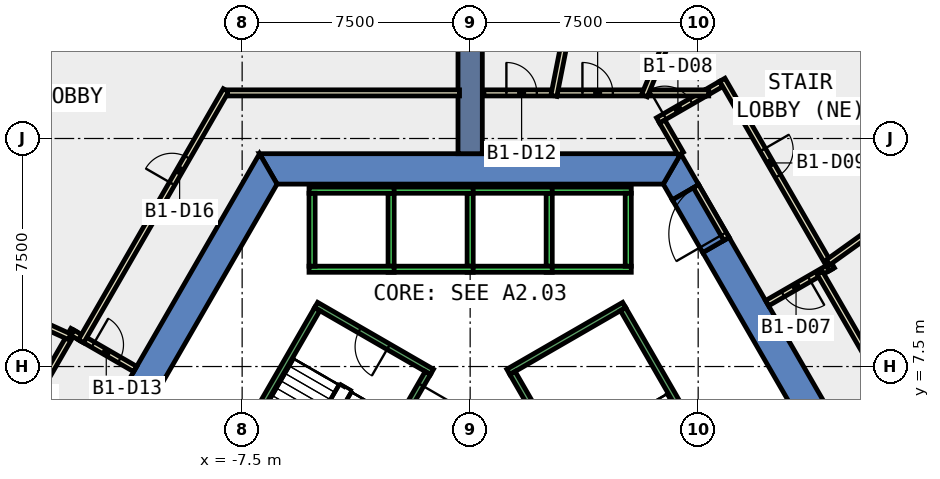
"""IFC4 building model, lengths in metres.
Left out: names, types, materials, properties, quantities, classifications, styles, units other than length and angle.
Written with IfcOpenShell. Run it as: python <this file> out.ifc"""

import sys

from ifc_helpers import new_model, si_unit, direction, frame, frame_2d, origin, place, context, subcontext, project, spatial, polyline, rectangle, outline, extrude, element, fill, save


model = new_model("IFC4")
c1 = context("Model", 3, precision=1e-05, world=origin(), true_north=direction((0.0, 1.0)))
c2 = subcontext(c1, "Body", "Model", "MODEL_VIEW")
j1 = project(units=[si_unit("LENGTHUNIT", "METRE"), si_unit("PLANEANGLEUNIT", "RADIAN")], contexts=[c1])
p1 = place(None, origin())
s1 = spatial("IfcSite", under=j1, at=p1, CompositionType="ELEMENT")
p2 = place(p1, origin())
s2 = spatial("IfcBuilding", under=s1, at=p2, CompositionType="ELEMENT")
p3 = place(p2, frame((0.0, 0.0, -5.5)))
s3 = spatial("IfcBuildingStorey", under=s2, at=p3, CompositionType="ELEMENT", Elevation=-5.5)
p4 = place(p3, frame((0.0, 0.0, -0.42)))
e1 = element("IfcWall", 1, at=p4, inside=s3, PredefinedType="SHEAR", context=c2, shape_type="SweptSolid", body=[
    extrude(outline(polyline([(8.517, 11.748), (7.651, 11.248), (12.702, 2.5), (13.856, 2.5), (8.517, 11.748)])), origin(), (0.0, 0.0, 1.0), 5.42),
])
p5 = place(p3, frame((0.0, 0.0, -0.42)))
e2 = element("IfcWall", 2, at=p5, inside=s3, PredefinedType="SHEAR", context=c2, shape_type="SweptSolid", body=[
    extrude(outline(polyline([(6.651, 12.98), (7.517, 13.48), (6.928, 14.5), (6.351, 13.5), (6.651, 12.98)])), origin(), (0.0, 0.0, 1.0), 5.42),
])
p6 = place(p3, frame((0.0, 0.0, 3.6)))
e3 = element("IfcWall", 3, at=p6, inside=s3, PredefinedType="SHEAR", context=c2, shape_type="SweptSolid", body=[
    extrude(outline(polyline([(7.517, 13.48), (6.651, 12.98), (7.651, 11.248), (8.517, 11.748), (7.517, 13.48)])), origin(), (0.0, 0.0, 1.0), 1.4),
])
p7 = place(p3, frame((0.0, 0.0, -0.42)))
e4 = element("IfcWall", 4, at=p7, inside=s3, PredefinedType="SHEAR", context=c2, shape_type="SweptSolid", body=[
    extrude(outline(polyline([(6.928, 14.5), (-6.928, 14.5), (-6.351, 13.5), (6.351, 13.5), (6.928, 14.5)])), origin(), (0.0, 0.0, 1.0), 5.42),
])
p8 = place(p3, frame((0.0, 0.0, -0.42)))
e5 = element("IfcWall", 5, at=p8, inside=s3, PredefinedType="SHEAR", context=c2, shape_type="SweptSolid", body=[
    extrude(outline(polyline([(-12.267, 5.252), (-11.402, 4.752), (-6.351, 13.5), (-6.928, 14.5), (-12.267, 5.252)])), origin(), (0.0, 0.0, 1.0), 5.42),
])
p9 = place(p3, frame((0.0, 14.5, -0.42), z_axis=(0.0, 0.0, 1.0), x_axis=(0.0, 1.0, 0.0)))
e6 = element("IfcWall", 6, at=p9, inside=s3, PredefinedType="SHEAR", context=c2, shape_type="SweptSolid", body=[
    extrude(rectangle(XDim=9.0, YDim=0.8, at=frame_2d((4.5, 0.0))), origin(), (0.0, 0.0, 1.0), 5.42),
])
p10 = place(p3, frame((11.845, 10.783, 0.0), z_axis=(0.0, 0.0, 1.0), x_axis=(-0.865973769406, -0.500089422704, 0.0)))
e7 = element("IfcWall", 7, at=p10, inside=s3, PredefinedType="PARTITIONING", context=c2, shape_type="SweptSolid", body=[
    extrude(rectangle(XDim=2.399, YDim=0.2, at=frame_2d((1.2, 0.0))), origin(), (0.0, 0.0, 1.0), 4.9),
])
p11 = place(p10, frame((0.8, 0.0, 0.0)))
e8 = element("IfcOpeningElement", 8, at=p11, cuts=e7, PredefinedType="OPENING", context=c2, shape_type="SweptSolid", body=[
    extrude(rectangle(XDim=1.0, YDim=2.1, at=frame_2d((0.5, 1.05))), frame((0.0, 0.11, 0.0), z_axis=(0.0, -1.0, 0.0), x_axis=(1.0, 0.0, 0.0)), (0.0, 0.0, 1.0), 0.22),
])
p12 = place(p3, frame((6.18, 15.595, 0.0), z_axis=(0.0, 0.0, 1.0), x_axis=(0.866102512622, 0.499866419787, 0.0)))
e9 = element("IfcWall", 9, at=p12, inside=s3, PredefinedType="PARTITIONING", context=c2, shape_type="SweptSolid", body=[
    extrude(rectangle(XDim=1.811, YDim=0.2, at=frame_2d((0.905, 0.0))), origin(), (0.0, 0.0, 1.0), 4.9),
])
p13 = place(p12, frame((0.254, 0.0, 0.0)))
e10 = element("IfcOpeningElement", 10, at=p13, cuts=e9, PredefinedType="OPENING", context=c2, shape_type="SweptSolid", body=[
    extrude(rectangle(XDim=1.0, YDim=2.1, at=frame_2d((0.5, 1.05))), frame((0.0, 0.11, 0.0), z_axis=(0.0, -1.0, 0.0), x_axis=(1.0, 0.0, 0.0)), (0.0, 0.0, 1.0), 0.22),
])
p14 = place(p3, frame((6.317, 15.558, 0.0), z_axis=(0.0, 0.0, 1.0), x_axis=(0.500114474492, -0.865959301817, 0.0)))
e11 = element("IfcWall", 11, at=p14, inside=s3, PredefinedType="PARTITIONING", context=c2, shape_type="SweptSolid", body=[
    extrude(rectangle(XDim=1.222, YDim=0.2, at=frame_2d((0.611, 0.0))), origin(), (0.0, 0.0, 1.0), 4.9),
])
p15 = place(p3, frame((7.748, 16.5, 0.0), z_axis=(0.0, 0.0, 1.0), x_axis=(0.865681519127, 0.500595153234, 0.0)))
e12 = element("IfcWall", 12, at=p15, inside=s3, PredefinedType="PARTITIONING", context=c2, shape_type="SweptSolid", body=[
    extrude(rectangle(XDim=0.589, YDim=0.2, at=frame_2d((0.294, 0.0))), origin(), (0.0, 0.0, 1.0), 4.9),
])
p16 = place(p3, frame((8.295, 16.932, 0.0), z_axis=(0.0, 0.0, 1.0), x_axis=(0.499982693035, -0.866035395735, 0.0)))
e13 = element("IfcWall", 13, at=p16, inside=s3, PredefinedType="PARTITIONING", context=c2, shape_type="SweptSolid", body=[
    extrude(rectangle(XDim=7.2, YDim=0.2, at=frame_2d((3.6, 0.0))), origin(), (0.0, 0.0, 1.0), 4.9),
])
p17 = place(p16, frame((2.659, 0.0, 0.0)))
e14 = element("IfcOpeningElement", 14, at=p17, cuts=e13, PredefinedType="OPENING", context=c2, shape_type="SweptSolid", body=[
    extrude(rectangle(XDim=1.0, YDim=2.1, at=frame_2d((0.5, 1.05))), frame((0.0, 0.11, 0.0), z_axis=(0.0, -1.0, 0.0), x_axis=(1.0, 0.0, 0.0)), (0.0, 0.0, 1.0), 0.22),
])
p18 = place(p3, frame((11.499, 10.583, 0.0), z_axis=(0.0, 0.0, 1.0), x_axis=(0.499933044277, -0.866064057238, 0.0)))
e15 = element("IfcWall", 15, at=p18, inside=s3, PredefinedType="PARTITIONING", context=c2, shape_type="SweptSolid", body=[
    extrude(rectangle(XDim=9.433, YDim=0.2, at=frame_2d((4.717, 0.0))), origin(), (0.0, 0.0, 1.0), 4.9),
])
p19 = place(p18, frame((8.283, 0.0, 0.0)))
e16 = element("IfcOpeningElement", 16, at=p19, cuts=e15, PredefinedType="OPENING", context=c2, shape_type="SweptSolid", body=[
    extrude(rectangle(XDim=1.0, YDim=2.1, at=frame_2d((0.5, 1.05))), frame((0.0, 0.11, 0.0), z_axis=(0.0, -1.0, 0.0), x_axis=(1.0, 0.0, 0.0)), (0.0, 0.0, 1.0), 0.22),
])
p20 = place(p3, frame((5.871, 16.5, 0.0), z_axis=(0.0, 0.0, 1.0), x_axis=(1.0, 0.0, 0.0)))
e17 = element("IfcWall", 17, at=p20, inside=s3, PredefinedType="PARTITIONING", context=c2, shape_type="SweptSolid", body=[
    extrude(rectangle(XDim=1.977, YDim=0.2, at=frame_2d((0.988, 0.0))), origin(), (0.0, 0.0, 1.0), 4.9),
])
p21 = place(p3, frame((2.872, 16.5, 0.0), z_axis=(0.0, 0.0, 1.0), x_axis=(1.0, 0.0, 0.0)))
e18 = element("IfcWall", 18, at=p21, inside=s3, PredefinedType="PARTITIONING", context=c2, shape_type="SweptSolid", body=[
    extrude(rectangle(XDim=2.799, YDim=0.2, at=frame_2d((1.399, 0.0))), origin(), (0.0, 0.0, 1.0), 4.9),
])
p22 = place(p21, frame((0.821, 0.0, 0.0)))
e19 = element("IfcOpeningElement", 19, at=p22, cuts=e18, PredefinedType="OPENING", context=c2, shape_type="SweptSolid", body=[
    extrude(rectangle(XDim=1.0, YDim=2.1, at=frame_2d((0.5, 1.05))), frame((0.0, 0.11, 0.0), z_axis=(0.0, -1.0, 0.0), x_axis=(1.0, 0.0, 0.0)), (0.0, 0.0, 1.0), 0.22),
])
p23 = place(p3, frame((0.45, 16.5, 0.0), z_axis=(0.0, 0.0, 1.0), x_axis=(1.0, 0.0, 0.0)))
e20 = element("IfcWall", 20, at=p23, inside=s3, PredefinedType="PARTITIONING", context=c2, shape_type="SweptSolid", body=[
    extrude(rectangle(XDim=2.222, YDim=0.2, at=frame_2d((1.111, 0.0))), origin(), (0.0, 0.0, 1.0), 4.9),
])
p24 = place(p23, frame((0.742, 0.0, 0.0)))
e21 = element("IfcOpeningElement", 21, at=p24, cuts=e20, PredefinedType="OPENING", context=c2, shape_type="SweptSolid", body=[
    extrude(rectangle(XDim=1.0, YDim=2.1, at=frame_2d((0.5, 1.05))), frame((0.0, 0.11, 0.0), z_axis=(0.0, -1.0, 0.0), x_axis=(1.0, 0.0, 0.0)), (0.0, 0.0, 1.0), 0.22),
])
p25 = place(p3, frame((22.57, 18.658, 0.0), z_axis=(0.0, 0.0, 1.0), x_axis=(-0.813097421088, -0.582127635334, 0.0)))
e22 = element("IfcWall", 22, at=p25, inside=s3, PredefinedType="PARTITIONING", context=c2, shape_type="SweptSolid", body=[
    extrude(rectangle(XDim=13.289, YDim=0.2, at=frame_2d((6.645, 0.0))), origin(), (0.0, 0.0, 1.0), 4.9),
])
p26 = place(p3, frame((5.733, 16.408, 0.0), z_axis=(0.0, 0.0, 1.0), x_axis=(0.381121284815, 0.924525049018, 0.0)))
e23 = element("IfcWall", 23, at=p26, inside=s3, PredefinedType="PARTITIONING", context=c2, shape_type="SweptSolid", body=[
    extrude(rectangle(XDim=6.644, YDim=0.2, at=frame_2d((3.322, 0.0))), origin(), (0.0, 0.0, 1.0), 4.9),
])
p27 = place(p3, frame((2.753, 16.402, 0.0), z_axis=(0.0, 0.0, 1.0), x_axis=(0.194139507047, 0.980973930236, 0.0)))
e24 = element("IfcWall", 24, at=p27, inside=s3, PredefinedType="PARTITIONING", context=c2, shape_type="SweptSolid", body=[
    extrude(rectangle(XDim=6.367, YDim=0.2, at=frame_2d((3.184, 0.0))), origin(), (0.0, 0.0, 1.0), 4.9),
])
p28 = place(p3, frame((-12.749, 8.417, 0.0), z_axis=(0.0, 0.0, 1.0), x_axis=(0.866010750942, -0.50002537861, 0.0)))
e25 = element("IfcWall", 25, at=p28, inside=s3, PredefinedType="PARTITIONING", context=c2, shape_type="SweptSolid", body=[
    extrude(rectangle(XDim=2.0, YDim=0.2, at=frame_2d((1.0, 0.0))), origin(), (0.0, 0.0, 1.0), 4.9),
])
p29 = place(p28, frame((0.4, 0.0, 0.0)))
e26 = element("IfcOpeningElement", 26, at=p29, cuts=e25, PredefinedType="OPENING", context=c2, shape_type="SweptSolid", body=[
    extrude(rectangle(XDim=1.0, YDim=2.1, at=frame_2d((0.5, 1.05))), frame((0.0, 0.11, 0.0), z_axis=(0.0, -1.0, 0.0), x_axis=(1.0, 0.0, 0.0)), (0.0, 0.0, 1.0), 0.22),
])
p30 = place(p3, frame((-16.645, 2.468, 0.0), z_axis=(0.0, 0.0, 1.0), x_axis=(0.499968011863, 0.866043871356, 0.0)))
e27 = element("IfcWall", 27, at=p30, inside=s3, PredefinedType="PARTITIONING", context=c2, shape_type="SweptSolid", body=[
    extrude(rectangle(XDim=7.201, YDim=0.2, at=frame_2d((3.6, 0.0))), origin(), (0.0, 0.0, 1.0), 4.9),
])
p31 = place(p30, frame((2.409, 0.0, 0.0)))
e28 = element("IfcOpeningElement", 28, at=p31, cuts=e27, PredefinedType="OPENING", context=c2, shape_type="SweptSolid", body=[
    extrude(rectangle(XDim=1.0, YDim=2.1, at=frame_2d((0.5, 1.05))), frame((0.0, 0.11, 0.0), z_axis=(0.0, -1.0, 0.0), x_axis=(1.0, 0.0, 0.0)), (0.0, 0.0, 1.0), 0.22),
])
p32 = place(p3, frame((-13.082, 8.609, 0.0), z_axis=(0.0, 0.0, 1.0), x_axis=(0.865998573537, -0.500046468473, 0.0)))
e29 = element("IfcWall", 29, at=p32, inside=s3, PredefinedType="PARTITIONING", context=c2, shape_type="SweptSolid", body=[
    extrude(rectangle(XDim=0.37, YDim=0.2, at=frame_2d((0.185, 0.0))), origin(), (0.0, 0.0, 1.0), 4.9),
])
p33 = place(p3, frame((-12.799, 8.33, 0.0), z_axis=(0.0, 0.0, 1.0), x_axis=(0.499923440311, 0.86606960103, 0.0)))
e30 = element("IfcWall", 30, at=p33, inside=s3, PredefinedType="PARTITIONING", context=c2, shape_type="SweptSolid", body=[
    extrude(rectangle(XDim=9.534, YDim=0.2, at=frame_2d((4.767, 0.0))), origin(), (0.0, 0.0, 1.0), 4.9),
])
p34 = place(p33, frame((5.986, 0.0, 0.0)))
e31 = element("IfcOpeningElement", 31, at=p34, cuts=e30, PredefinedType="OPENING", context=c2, shape_type="SweptSolid", body=[
    extrude(rectangle(XDim=1.0, YDim=2.1, at=frame_2d((0.5, 1.05))), frame((0.0, 0.11, 0.0), z_axis=(0.0, -1.0, 0.0), x_axis=(1.0, 0.0, 0.0)), (0.0, 0.0, 1.0), 0.22),
])
p35 = place(p3, frame((-7.983, 16.5, 0.0), z_axis=(0.0, 0.0, 1.0), x_axis=(1.0, 0.0, 0.0)))
e32 = element("IfcWall", 32, at=p35, inside=s3, PredefinedType="PARTITIONING", context=c2, shape_type="SweptSolid", body=[
    extrude(rectangle(XDim=7.633, YDim=0.2, at=frame_2d((3.816, 0.0))), origin(), (0.0, 0.0, 1.0), 4.9),
])
p36 = place(p3, frame((-22.527, 12.721, 0.0), z_axis=(0.0, 0.0, 1.0), x_axis=(0.910643923171, -0.413192019758, 0.0)))
e33 = element("IfcWall", 33, at=p36, inside=s3, PredefinedType="PARTITIONING", context=c2, shape_type="SweptSolid", body=[
    extrude(rectangle(XDim=10.269, YDim=0.2, at=frame_2d((5.134, 0.0))), origin(), (0.0, 0.0, 1.0), 4.9),
])
p37 = place(p3, frame((8.43, 11.698, 0.0), z_axis=(0.0, 0.0, 1.0), x_axis=(-0.50002537861, 0.866010750942, 0.0)))
e34 = element("IfcWall", 34, at=p37, inside=s3, PredefinedType="PARTITIONING", context=c2, shape_type="SweptSolid", body=[
    extrude(rectangle(XDim=2.0, YDim=0.2, at=frame_2d((1.0, 0.0))), origin(), (0.0, 0.0, 1.0), 2.4),
])
p38 = place(p37, frame((0.19, 0.0, 0.0)))
e35 = element("IfcOpeningElement", 35, at=p38, cuts=e34, PredefinedType="OPENING", context=c2, shape_type="SweptSolid", body=[
    extrude(rectangle(XDim=1.8, YDim=2.1, at=frame_2d((0.9, 1.05))), frame((0.0, 0.11, 0.0), z_axis=(0.0, -1.0, 0.0), x_axis=(1.0, 0.0, 0.0)), (0.0, 0.0, 1.0), 0.22),
])
for number, where, z_axis, x_axis in (
    (36, (5.3, 10.7, 0.0), (0.0, 0.0, 1.0), (-1.0, 0.0, 0.0)),
    (37, (5.3, 13.3, 0.0), (0.0, 0.0, 1.0), (-1.0, 0.0, 0.0)),
):
    element("IfcWall", number, at=place(p3, frame(where, z_axis=z_axis, x_axis=x_axis)), inside=s3, PredefinedType="STANDARD", context=c2, shape_type="SweptSolid", body=[
        extrude(rectangle(XDim=2.8, YDim=0.2, at=frame_2d((1.4, 0.0))), origin(), (0.0, 0.0, 1.0), 3.6),
    ])
for number, where, z_axis, x_axis in (
    (38, (5.2, 10.8, 0.0), (0.0, 0.0, 1.0), (0.0, 1.0, 0.0)),
    (39, (2.6, 10.8, 0.0), (0.0, 0.0, 1.0), (0.0, 1.0, 0.0)),
):
    element("IfcWall", number, at=place(p3, frame(where, z_axis=z_axis, x_axis=x_axis)), inside=s3, PredefinedType="STANDARD", context=c2, shape_type="SweptSolid", body=[
        extrude(rectangle(XDim=2.4, YDim=0.2, at=frame_2d((1.2, 0.0))), origin(), (0.0, 0.0, 1.0), 3.6),
    ])
for number, where, z_axis, x_axis in (
    (40, (2.7, 10.7, 0.0), (0.0, 0.0, 1.0), (-1.0, 0.0, 0.0)),
    (41, (2.7, 13.3, 0.0), (0.0, 0.0, 1.0), (-1.0, 0.0, 0.0)),
):
    element("IfcWall", number, at=place(p3, frame(where, z_axis=z_axis, x_axis=x_axis)), inside=s3, PredefinedType="STANDARD", context=c2, shape_type="SweptSolid", body=[
        extrude(rectangle(XDim=2.8, YDim=0.2, at=frame_2d((1.4, 0.0))), origin(), (0.0, 0.0, 1.0), 3.6),
    ])
p39 = place(p3, frame((0.0, 10.8, 0.0), z_axis=(0.0, 0.0, 1.0), x_axis=(0.0, 1.0, 0.0)))
e42 = element("IfcWall", 42, at=p39, inside=s3, PredefinedType="STANDARD", context=c2, shape_type="SweptSolid", body=[
    extrude(rectangle(XDim=2.4, YDim=0.2, at=frame_2d((1.2, 0.0))), origin(), (0.0, 0.0, 1.0), 3.6),
])
for number, where, z_axis, x_axis in (
    (43, (0.1, 10.7, 0.0), (0.0, 0.0, 1.0), (-1.0, 0.0, 0.0)),
    (44, (0.1, 13.3, 0.0), (0.0, 0.0, 1.0), (-1.0, 0.0, 0.0)),
):
    element("IfcWall", number, at=place(p3, frame(where, z_axis=z_axis, x_axis=x_axis)), inside=s3, PredefinedType="STANDARD", context=c2, shape_type="SweptSolid", body=[
        extrude(rectangle(XDim=2.8, YDim=0.2, at=frame_2d((1.4, 0.0))), origin(), (0.0, 0.0, 1.0), 3.6),
    ])
p40 = place(p3, frame((-2.6, 10.8, 0.0), z_axis=(0.0, 0.0, 1.0), x_axis=(0.0, 1.0, 0.0)))
e45 = element("IfcWall", 45, at=p40, inside=s3, PredefinedType="STANDARD", context=c2, shape_type="SweptSolid", body=[
    extrude(rectangle(XDim=2.4, YDim=0.2, at=frame_2d((1.2, 0.0))), origin(), (0.0, 0.0, 1.0), 3.6),
])
for number, where, z_axis, x_axis in (
    (46, (-2.5, 10.7, 0.0), (0.0, 0.0, 1.0), (-1.0, 0.0, 0.0)),
    (47, (-2.5, 13.3, 0.0), (0.0, 0.0, 1.0), (-1.0, 0.0, 0.0)),
):
    element("IfcWall", number, at=place(p3, frame(where, z_axis=z_axis, x_axis=x_axis)), inside=s3, PredefinedType="STANDARD", context=c2, shape_type="SweptSolid", body=[
        extrude(rectangle(XDim=2.8, YDim=0.2, at=frame_2d((1.4, 0.0))), origin(), (0.0, 0.0, 1.0), 3.6),
    ])
p41 = place(p3, frame((-5.2, 10.8, 0.0), z_axis=(0.0, 0.0, 1.0), x_axis=(0.0, 1.0, 0.0)))
e48 = element("IfcWall", 48, at=p41, inside=s3, PredefinedType="STANDARD", context=c2, shape_type="SweptSolid", body=[
    extrude(rectangle(XDim=2.4, YDim=0.2, at=frame_2d((1.2, 0.0))), origin(), (0.0, 0.0, 1.0), 3.6),
])
p42 = place(p3, frame((1.256, 7.324, 0.0), z_axis=(0.0, 0.0, 1.0), x_axis=(0.866046073146, 0.499964197906, 0.0)))
e49 = element("IfcWall", 49, at=p42, inside=s3, PredefinedType="STANDARD", context=c2, shape_type="SweptSolid", body=[
    extrude(rectangle(XDim=4.4, YDim=0.2, at=frame_2d((2.2, 0.0))), origin(), (0.0, 0.0, 1.0), 4.9),
])
p43 = place(p3, frame((4.843, 1.312, 0.0), z_axis=(0.0, 0.0, 1.0), x_axis=(-0.499963383562, 0.866046543262, 0.0)))
e50 = element("IfcWall", 50, at=p43, inside=s3, PredefinedType="STANDARD", context=c2, shape_type="SweptSolid", body=[
    extrude(rectangle(XDim=6.9, YDim=0.2, at=frame_2d((3.45, 0.0))), origin(), (0.0, 0.0, 1.0), 4.9),
])
p44 = place(p43, frame((0.45, 0.0, 0.0)))
e51 = element("IfcOpeningElement", 51, at=p44, cuts=e50, PredefinedType="OPENING", context=c2, shape_type="SweptSolid", body=[
    extrude(rectangle(XDim=1.1, YDim=2.2, at=frame_2d((0.55, 1.1))), frame((0.0, 0.11, 0.0), z_axis=(0.0, -1.0, 0.0), x_axis=(1.0, 0.0, 0.0)), (0.0, 0.0, 1.0), 0.22),
])
p45 = place(p3, frame((8.48, 3.412, 0.0), z_axis=(0.0, 0.0, 1.0), x_axis=(-0.499978703459, 0.866037698999, 0.0)))
e52 = element("IfcWall", 52, at=p45, inside=s3, PredefinedType="STANDARD", context=c2, shape_type="SweptSolid", body=[
    extrude(rectangle(XDim=6.9, YDim=0.2, at=frame_2d((3.45, 0.0))), origin(), (0.0, 0.0, 1.0), 4.9),
])
p46 = place(p3, frame((-1.256, 7.324, 0.0), z_axis=(0.0, 0.0, 1.0), x_axis=(-0.866046073146, 0.499964197906, 0.0)))
e53 = element("IfcWall", 53, at=p46, inside=s3, PredefinedType="STANDARD", context=c2, shape_type="SweptSolid", body=[
    extrude(rectangle(XDim=4.4, YDim=0.2, at=frame_2d((2.2, 0.0))), origin(), (0.0, 0.0, 1.0), 4.9),
])
p47 = place(p46, frame((1.65, 0.0, 0.0)))
e54 = element("IfcOpeningElement", 54, at=p47, cuts=e53, PredefinedType="OPENING", context=c2, shape_type="SweptSolid", body=[
    extrude(rectangle(XDim=1.1, YDim=2.2, at=frame_2d((0.55, 1.1))), frame((0.0, 0.11, 0.0), z_axis=(0.0, -1.0, 0.0), x_axis=(1.0, 0.0, 0.0)), (0.0, 0.0, 1.0), 0.22),
])
p48 = place(p3, frame((-1.393, 7.288, 0.0), z_axis=(0.0, 0.0, 1.0), x_axis=(-0.499963383562, -0.866046543262, 0.0)))
e55 = element("IfcWall", 55, at=p48, inside=s3, PredefinedType="STANDARD", context=c2, shape_type="SweptSolid", body=[
    extrude(rectangle(XDim=6.9, YDim=0.2, at=frame_2d((3.45, 0.0))), origin(), (0.0, 0.0, 1.0), 4.9),
])
p49 = place(p48, frame((0.45, 0.0, 0.0)))
e56 = element("IfcOpeningElement", 56, at=p49, cuts=e55, PredefinedType="OPENING", context=c2, shape_type="SweptSolid", body=[
    extrude(rectangle(XDim=1.1, YDim=2.2, at=frame_2d((0.55, 1.1))), frame((0.0, 0.11, 0.0), z_axis=(0.0, -1.0, 0.0), x_axis=(1.0, 0.0, 0.0)), (0.0, 0.0, 1.0), 0.22),
])
p50 = place(p3, frame((-5.03, 9.388, 0.0), z_axis=(0.0, 0.0, 1.0), x_axis=(-0.499978703459, -0.866037698999, 0.0)))
e57 = element("IfcWall", 57, at=p50, inside=s3, PredefinedType="STANDARD", context=c2, shape_type="SweptSolid", body=[
    extrude(rectangle(XDim=6.9, YDim=0.2, at=frame_2d((3.45, 0.0))), origin(), (0.0, 0.0, 1.0), 4.9),
])
p51 = place(p11, origin())
e58 = element("IfcDoor", 58, at=p51, inside=s3, OperationType="SINGLE_SWING_LEFT", PredefinedType="DOOR", context=c2, shape_type="SweptSolid", body=[
    extrude(rectangle(XDim=1.0, YDim=2.1, at=frame_2d((0.5, 1.05))), frame((0.0, 0.025, 0.0), z_axis=(0.0, -1.0, 0.0), x_axis=(1.0, 0.0, 0.0)), (0.0, 0.0, 1.0), 0.05),
])
fill(e8, e58)
p52 = place(p13, origin())
e59 = element("IfcDoor", 59, at=p52, inside=s3, OperationType="SINGLE_SWING_RIGHT", PredefinedType="DOOR", context=c2, shape_type="SweptSolid", body=[
    extrude(rectangle(XDim=1.0, YDim=2.1, at=frame_2d((0.5, 1.05))), frame((0.0, 0.025, 0.0), z_axis=(0.0, -1.0, 0.0), x_axis=(1.0, 0.0, 0.0)), (0.0, 0.0, 1.0), 0.05),
])
fill(e10, e59)
p53 = place(p17, origin())
e60 = element("IfcDoor", 60, at=p53, inside=s3, OperationType="SINGLE_SWING_LEFT", PredefinedType="DOOR", context=c2, shape_type="SweptSolid", body=[
    extrude(rectangle(XDim=1.0, YDim=2.1, at=frame_2d((0.5, 1.05))), frame((0.0, 0.025, 0.0), z_axis=(0.0, -1.0, 0.0), x_axis=(1.0, 0.0, 0.0)), (0.0, 0.0, 1.0), 0.05),
])
fill(e14, e60)
p54 = place(p22, origin())
e61 = element("IfcDoor", 61, at=p54, inside=s3, OperationType="SINGLE_SWING_LEFT", PredefinedType="DOOR", context=c2, shape_type="SweptSolid", body=[
    extrude(rectangle(XDim=1.0, YDim=2.1, at=frame_2d((0.5, 1.05))), frame((0.0, 0.025, 0.0), z_axis=(0.0, -1.0, 0.0), x_axis=(1.0, 0.0, 0.0)), (0.0, 0.0, 1.0), 0.05),
])
fill(e19, e61)
p55 = place(p24, origin())
e62 = element("IfcDoor", 62, at=p55, inside=s3, OperationType="SINGLE_SWING_RIGHT", PredefinedType="DOOR", context=c2, shape_type="SweptSolid", body=[
    extrude(rectangle(XDim=1.0, YDim=2.1, at=frame_2d((0.5, 1.05))), frame((0.0, 0.025, 0.0), z_axis=(0.0, -1.0, 0.0), x_axis=(1.0, 0.0, 0.0)), (0.0, 0.0, 1.0), 0.05),
])
fill(e21, e62)
p56 = place(p29, origin())
e63 = element("IfcDoor", 63, at=p56, inside=s3, OperationType="SINGLE_SWING_LEFT", PredefinedType="DOOR", context=c2, shape_type="SweptSolid", body=[
    extrude(rectangle(XDim=1.0, YDim=2.1, at=frame_2d((0.5, 1.05))), frame((0.0, 0.025, 0.0), z_axis=(0.0, -1.0, 0.0), x_axis=(1.0, 0.0, 0.0)), (0.0, 0.0, 1.0), 0.05),
])
fill(e26, e63)
p57 = place(p34, origin())
e64 = element("IfcDoor", 64, at=p57, inside=s3, OperationType="SINGLE_SWING_RIGHT", PredefinedType="DOOR", context=c2, shape_type="SweptSolid", body=[
    extrude(rectangle(XDim=1.0, YDim=2.1, at=frame_2d((0.5, 1.05))), frame((0.0, 0.025, 0.0), z_axis=(0.0, -1.0, 0.0), x_axis=(1.0, 0.0, 0.0)), (0.0, 0.0, 1.0), 0.05),
])
fill(e31, e64)
p58 = place(p38, origin())
e65 = element("IfcDoor", 65, at=p58, inside=s3, OperationType="DOUBLE_DOOR_SINGLE_SWING", PredefinedType="DOOR", context=c2, shape_type="SweptSolid", body=[
    extrude(rectangle(XDim=1.8, YDim=2.1, at=frame_2d((0.9, 1.05))), frame((0.0, 0.025, 0.0), z_axis=(0.0, -1.0, 0.0), x_axis=(1.0, 0.0, 0.0)), (0.0, 0.0, 1.0), 0.05),
])
fill(e35, e65)
p59 = place(p49, origin())
e66 = element("IfcDoor", 66, at=p59, inside=s3, OperationType="SINGLE_SWING_LEFT", PredefinedType="DOOR", context=c2, shape_type="SweptSolid", body=[
    extrude(rectangle(XDim=1.1, YDim=2.2, at=frame_2d((0.55, 1.1))), frame((0.0, 0.025, 0.0), z_axis=(0.0, -1.0, 0.0), x_axis=(1.0, 0.0, 0.0)), (0.0, 0.0, 1.0), 0.05),
])
fill(e56, e66)
p60 = place(p47, origin())
e67 = element("IfcDoor", 67, at=p60, inside=s3, OperationType="SINGLE_SWING_LEFT", PredefinedType="DOOR", context=c2, shape_type="SweptSolid", body=[
    extrude(rectangle(XDim=1.1, YDim=2.2, at=frame_2d((0.55, 1.1))), frame((0.0, 0.025, 0.0), z_axis=(0.0, -1.0, 0.0), x_axis=(1.0, 0.0, 0.0)), (0.0, 0.0, 1.0), 0.05),
])
fill(e54, e67)
save(model, sys.argv[1])
